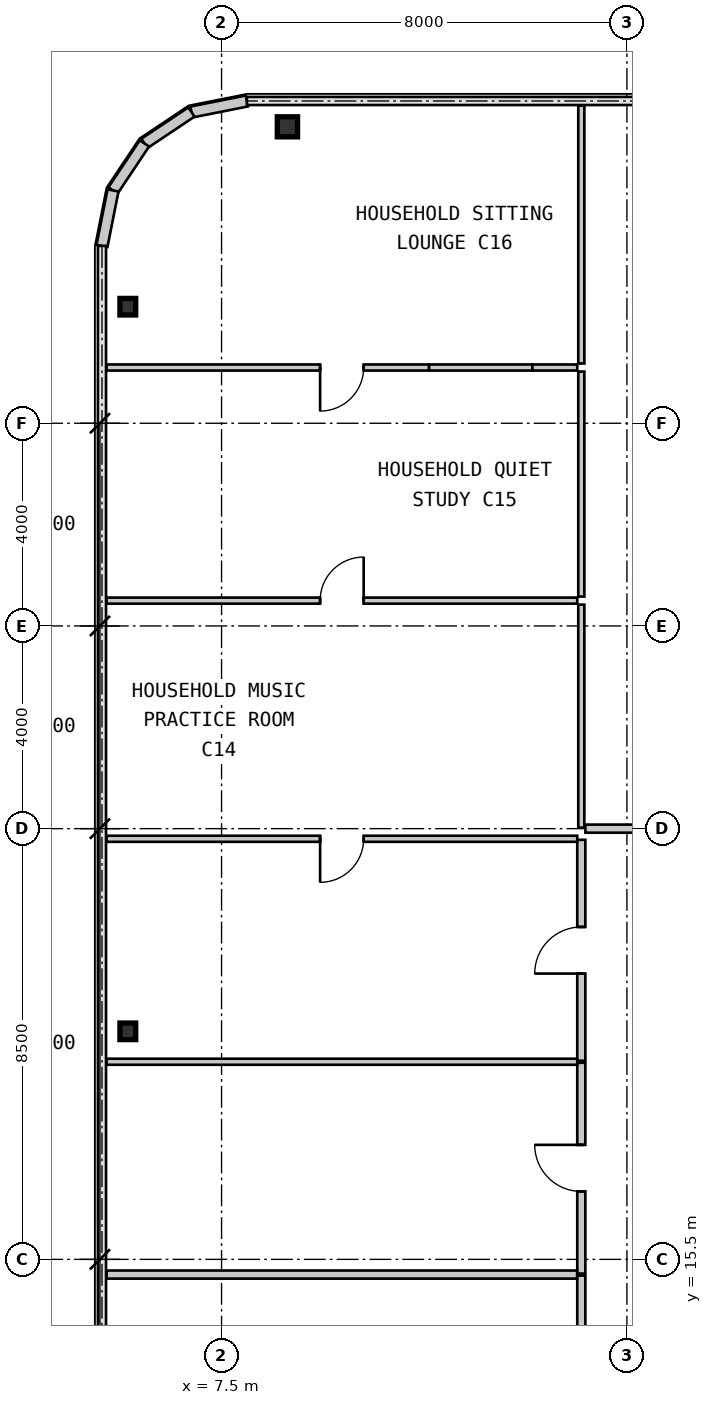
"""IFC4 building model, lengths in metres.
Left out: names, types, materials, properties, quantities, classifications, styles, units other than length and angle.
Written with IfcOpenShell. Run it as: python <this file> out.ifc"""

import sys

from ifc_helpers import new_model, si_unit, direction, frame, frame_2d, origin, origin_2d, place, context, subcontext, project, spatial, rectangle, i_section, extrude, source, transform, mapped, element, fill, save


model = new_model("IFC4")
c1 = context("Model", 3, precision=1e-05, world=origin(), true_north=direction((0.0, 1.0)))
c2 = subcontext(c1, "Body", "Model", "MODEL_VIEW")
j1 = project(units=[si_unit("LENGTHUNIT", "METRE"), si_unit("PLANEANGLEUNIT", "RADIAN")], contexts=[c1])
p1 = place(None, origin())
s1 = spatial("IfcSite", under=j1, at=p1, CompositionType="ELEMENT")
p2 = place(p1, origin())
s2 = spatial("IfcBuilding", under=s1, at=p2, CompositionType="ELEMENT")
p3 = place(p2, frame((0.0, 0.0, 19.95)))
s3 = spatial("IfcBuildingStorey", under=s2, at=p3, CompositionType="ELEMENT", Elevation=19.95)
m1 = source(origin(), c2, "Body", "SweptSolid", [
    extrude(i_section(OverallWidth=0.4, OverallDepth=0.396, WebThickness=0.022, FlangeThickness=0.034, at=origin_2d()), origin(), (0.0, 0.0, 1.0), 3.15),
])
p4 = place(p3, frame((8.8, 37.85, 0.0), z_axis=(0.0, 0.0, 1.0), x_axis=(1.0, 0.0, 0.0)))
e1 = element("IfcColumn", 1, at=p4, inside=s3, PredefinedType="COLUMN", context=c2, shape_type="MappedRepresentation", body=[
    mapped(m1, transform((0.0, 0.0, 0.0), scale=1.0)),
])
m2 = source(origin(), c2, "Body", "SweptSolid", [
    extrude(i_section(OverallWidth=0.311, OverallDepth=0.327, WebThickness=0.016, FlangeThickness=0.025, at=origin_2d()), origin(), (0.0, 0.0, 1.0), 3.15),
])
for number, where, z_axis, x_axis in (
    (2, (5.65, 20.0, 0.0), (0.0, 0.0, 1.0), (1.0, 0.0, 0.0)),
    (3, (5.65, 34.3, 0.0), (0.0, 0.0, 1.0), (1.0, 0.0, 0.0)),
):
    element("IfcColumn", number, at=place(p3, frame(where, z_axis=z_axis, x_axis=x_axis)), inside=s3, PredefinedType="COLUMN", context=c2, shape_type="MappedRepresentation", body=[
        mapped(m2, transform((0.0, 0.0, 0.0), scale=1.0)),
    ])
m3 = source(origin(), c2, "Body", "SweptSolid", [
    extrude(rectangle(XDim=1.116, YDim=0.22, at=frame_2d((0.558, 0.0))), origin(), (0.0, 0.0, 1.0), 2.93),
])
for number, where, z_axis, x_axis in (
    (4, (8.0, 38.36, 0.0), (0.0, 0.0, 1.0), (-0.981, -0.195, 0.0)),
    (5, (6.906, 38.142, 0.0), (0.0, 0.0, 1.0), (-0.831, -0.556, 0.0)),
    (6, (5.978, 37.522, 0.0), (0.0, 0.0, 1.0), (-0.556, -0.831, 0.0)),
    (7, (5.358, 36.594, 0.0), (0.0, 0.0, 1.0), (-0.195, -0.981, 0.0)),
):
    element("IfcWall", number, at=place(p3, frame(where, z_axis=z_axis, x_axis=x_axis)), inside=s3, PredefinedType="SOLIDWALL", context=c2, shape_type="MappedRepresentation", body=[
        mapped(m3, transform((0.0, 0.0, 0.0), scale=1.0)),
    ])
m4 = source(origin(), c2, "Body", "SweptSolid", [
    extrude(rectangle(XDim=3.959, YDim=0.16, at=frame_2d((1.98, 0.0))), origin(), (0.0, 0.0, 1.0), 2.93),
])
p5 = place(p3, frame((14.6, 11.22, 0.0), z_axis=(0.0, 0.0, 1.0), x_axis=(0.0, 1.0, 0.0)))
e8 = element("IfcWall", 8, at=p5, inside=s3, PredefinedType="PARTITIONING", context=c2, shape_type="MappedRepresentation", body=[
    mapped(m4, transform((0.0, 0.0, 0.0), scale=1.0)),
])
m5 = source(origin(), c2, "Body", "SweptSolid", [
    extrude(rectangle(XDim=1.05, YDim=2.1, at=frame_2d((0.525, 1.05))), frame((0.0, 0.09, 0.0), z_axis=(0.0, -1.0, 0.0), x_axis=(1.0, 0.0, 0.0)), (0.0, 0.0, 1.0), 0.18),
])
p6 = place(p5, frame((1.455, 0.0, 0.0)))
e9 = element("IfcOpeningElement", 9, at=p6, cuts=e8, PredefinedType="OPENING", context=c2, shape_type="MappedRepresentation", body=[
    mapped(m5, transform((0.0, 0.0, 0.0), scale=1.0)),
])
m6 = source(origin(), c2, "Body", "SweptSolid", [
    extrude(rectangle(XDim=4.16, YDim=0.16, at=frame_2d((2.08, 0.0))), origin(), (0.0, 0.0, 1.0), 2.93),
])
p7 = place(p3, frame((14.6, 15.22, 0.0), z_axis=(0.0, 0.0, 1.0), x_axis=(0.0, 1.0, 0.0)))
e10 = element("IfcWall", 10, at=p7, inside=s3, PredefinedType="PARTITIONING", context=c2, shape_type="MappedRepresentation", body=[
    mapped(m6, transform((0.0, 0.0, 0.0), scale=1.0)),
])
m7 = source(origin(), c2, "Body", "SweptSolid", [
    extrude(rectangle(XDim=0.92, YDim=2.1, at=frame_2d((0.46, 1.05))), frame((0.0, 0.09, 0.0), z_axis=(0.0, -1.0, 0.0), x_axis=(1.0, 0.0, 0.0)), (0.0, 0.0, 1.0), 0.18),
])
p8 = place(p7, frame((1.62, 0.0, 0.0)))
e11 = element("IfcOpeningElement", 11, at=p8, cuts=e10, PredefinedType="OPENING", context=c2, shape_type="MappedRepresentation", body=[
    mapped(m7, transform((0.0, 0.0, 0.0), scale=1.0)),
])
m8 = source(origin(), c2, "Body", "SweptSolid", [
    extrude(rectangle(XDim=4.36, YDim=0.16, at=frame_2d((2.18, 0.0))), origin(), (0.0, 0.0, 1.0), 2.93),
])
p9 = place(p3, frame((14.6, 19.42, 0.0), z_axis=(0.0, 0.0, 1.0), x_axis=(0.0, 1.0, 0.0)))
e12 = element("IfcWall", 12, at=p9, inside=s3, PredefinedType="PARTITIONING", context=c2, shape_type="MappedRepresentation", body=[
    mapped(m8, transform((0.0, 0.0, 0.0), scale=1.0)),
])
p10 = place(p9, frame((1.72, 0.0, 0.0)))
e13 = element("IfcOpeningElement", 13, at=p10, cuts=e12, PredefinedType="OPENING", context=c2, shape_type="MappedRepresentation", body=[
    mapped(m7, transform((0.0, 0.0, 0.0), scale=1.0)),
])
m9 = source(origin(), c2, "Body", "SweptSolid", [
    extrude(rectangle(XDim=4.13, YDim=0.16, at=frame_2d((2.065, 0.0))), origin(), (0.0, 0.0, 1.0), 2.93),
])
p11 = place(p3, frame((14.68, 24.0, 0.0), z_axis=(0.0, 0.0, 1.0), x_axis=(1.0, 0.0, 0.0)))
e14 = element("IfcWall", 14, at=p11, inside=s3, PredefinedType="PARTITIONING", context=c2, shape_type="MappedRepresentation", body=[
    mapped(m9, transform((0.0, 0.0, 0.0), scale=1.0)),
])
p12 = place(p11, frame((1.69, 0.0, 0.0)))
e15 = element("IfcOpeningElement", 15, at=p12, cuts=e14, PredefinedType="OPENING", context=c2, shape_type="MappedRepresentation", body=[
    mapped(m7, transform((0.0, 0.0, 0.0), scale=1.0)),
])
m10 = source(origin(), c2, "Body", "SweptSolid", [
    extrude(rectangle(XDim=9.286, YDim=0.16, at=frame_2d((4.643, 0.0))), origin(), (0.0, 0.0, 1.0), 2.93),
])
p13 = place(p3, frame((5.232, 15.2, 0.0), z_axis=(0.0, 0.0, 1.0), x_axis=(1.0, 0.0, 0.0)))
e16 = element("IfcWall", 16, at=p13, inside=s3, PredefinedType="PARTITIONING", context=c2, shape_type="MappedRepresentation", body=[
    mapped(m10, transform((0.0, 0.0, 0.0), scale=1.0)),
])
m11 = source(origin(), c2, "Body", "SweptSolid", [
    extrude(rectangle(XDim=9.29, YDim=0.12, at=frame_2d((4.645, 0.0))), origin(), (0.0, 0.0, 1.0), 2.93),
])
p14 = place(p3, frame((5.23, 19.4, 0.0), z_axis=(0.0, 0.0, 1.0), x_axis=(1.0, 0.0, 0.0)))
e17 = element("IfcWall", 17, at=p14, inside=s3, PredefinedType="PARTITIONING", context=c2, shape_type="MappedRepresentation", body=[
    mapped(m11, transform((0.0, 0.0, 0.0), scale=1.0)),
])
p15 = place(p3, frame((5.23, 23.8, 0.0), z_axis=(0.0, 0.0, 1.0), x_axis=(1.0, 0.0, 0.0)))
e18 = element("IfcWall", 18, at=p15, inside=s3, PredefinedType="PARTITIONING", context=c2, shape_type="MappedRepresentation", body=[
    mapped(m11, transform((0.0, 0.0, 0.0), scale=1.0)),
])
m12 = source(origin(), c2, "Body", "SweptSolid", [
    extrude(rectangle(XDim=0.86, YDim=2.1, at=frame_2d((0.43, 1.05))), frame((0.0, 0.07, 0.0), z_axis=(0.0, -1.0, 0.0), x_axis=(1.0, 0.0, 0.0)), (0.0, 0.0, 1.0), 0.14),
])
p16 = place(p15, frame((4.215, 0.0, 0.0)))
e19 = element("IfcOpeningElement", 19, at=p16, cuts=e18, PredefinedType="OPENING", context=c2, shape_type="MappedRepresentation", body=[
    mapped(m12, transform((0.0, 0.0, 0.0), scale=1.0)),
])
p17 = place(p3, frame((5.23, 28.5, 0.0), z_axis=(0.0, 0.0, 1.0), x_axis=(1.0, 0.0, 0.0)))
e20 = element("IfcWall", 20, at=p17, inside=s3, PredefinedType="PARTITIONING", context=c2, shape_type="MappedRepresentation", body=[
    mapped(m11, transform((0.0, 0.0, 0.0), scale=1.0)),
])
p18 = place(p17, frame((4.215, 0.0, 0.0)))
e21 = element("IfcOpeningElement", 21, at=p18, cuts=e20, PredefinedType="OPENING", context=c2, shape_type="MappedRepresentation", body=[
    mapped(m12, transform((0.0, 0.0, 0.0), scale=1.0)),
])
m13 = source(origin(), c2, "Body", "SweptSolid", [
    extrude(rectangle(XDim=4.4, YDim=0.12, at=frame_2d((2.2, 0.0))), origin(), (0.0, 0.0, 1.0), 2.93),
])
p19 = place(p3, frame((14.6, 28.42, 0.0), z_axis=(0.0, 0.0, 1.0), x_axis=(0.0, -1.0, 0.0)))
e22 = element("IfcWall", 22, at=p19, inside=s3, PredefinedType="PARTITIONING", context=c2, shape_type="MappedRepresentation", body=[
    mapped(m13, transform((0.0, 0.0, 0.0), scale=1.0)),
])
m14 = source(origin(), c2, "Body", "SweptSolid", [
    extrude(rectangle(XDim=6.365, YDim=0.12, at=frame_2d((3.183, 0.0))), origin(), (0.0, 0.0, 1.0), 2.93),
])
p20 = place(p3, frame((5.23, 33.1, 0.0), z_axis=(0.0, 0.0, 1.0), x_axis=(1.0, 0.0, 0.0)))
e23 = element("IfcWall", 23, at=p20, inside=s3, PredefinedType="PARTITIONING", context=c2, shape_type="MappedRepresentation", body=[
    mapped(m14, transform((0.0, 0.0, 0.0), scale=1.0)),
])
p21 = place(p20, frame((4.215, 0.0, 0.0)))
e24 = element("IfcOpeningElement", 24, at=p21, cuts=e23, PredefinedType="OPENING", context=c2, shape_type="MappedRepresentation", body=[
    mapped(m12, transform((0.0, 0.0, 0.0), scale=1.0)),
])
m15 = source(origin(), c2, "Body", "SweptSolid", [
    extrude(rectangle(XDim=2.04, YDim=0.12, at=frame_2d((1.02, 0.0))), origin(), (0.0, 0.0, 1.0), 2.328),
])
p22 = place(p3, frame((11.595, 33.1, 0.0), z_axis=(0.0, 0.0, 1.0), x_axis=(1.0, 0.0, 0.0)))
e25 = element("IfcWall", 25, at=p22, inside=s3, PredefinedType="PARTITIONING", context=c2, shape_type="MappedRepresentation", body=[
    mapped(m15, transform((0.0, 0.0, 0.0), scale=1.0)),
])
m16 = source(origin(), c2, "Body", "SweptSolid", [
    extrude(rectangle(XDim=0.885, YDim=0.12, at=frame_2d((0.442, 0.0))), origin(), (0.0, 0.0, 1.0), 2.93),
])
p23 = place(p3, frame((13.635, 33.1, 0.0), z_axis=(0.0, 0.0, 1.0), x_axis=(1.0, 0.0, 0.0)))
e26 = element("IfcWall", 26, at=p23, inside=s3, PredefinedType="PARTITIONING", context=c2, shape_type="MappedRepresentation", body=[
    mapped(m16, transform((0.0, 0.0, 0.0), scale=1.0)),
])
m17 = source(origin(), c2, "Body", "SweptSolid", [
    extrude(rectangle(XDim=4.44, YDim=0.12, at=frame_2d((2.22, 0.0))), origin(), (0.0, 0.0, 1.0), 2.93),
])
p24 = place(p3, frame((14.6, 33.02, 0.0), z_axis=(0.0, 0.0, 1.0), x_axis=(0.0, -1.0, 0.0)))
e27 = element("IfcWall", 27, at=p24, inside=s3, PredefinedType="PARTITIONING", context=c2, shape_type="MappedRepresentation", body=[
    mapped(m17, transform((0.0, 0.0, 0.0), scale=1.0)),
])
m18 = source(origin(), c2, "Body", "SweptSolid", [
    extrude(rectangle(XDim=5.09, YDim=0.12, at=frame_2d((2.545, 0.0))), origin(), (0.0, 0.0, 1.0), 2.93),
])
p25 = place(p3, frame((14.6, 38.27, 0.0), z_axis=(0.0, 0.0, 1.0), x_axis=(0.0, -1.0, 0.0)))
e28 = element("IfcWall", 28, at=p25, inside=s3, PredefinedType="PARTITIONING", context=c2, shape_type="MappedRepresentation", body=[
    mapped(m18, transform((0.0, 0.0, 0.0), scale=1.0)),
])
m19 = source(origin(), c2, "Body", "SweptSolid", [
    extrude(rectangle(XDim=0.92, YDim=2.1, at=frame_2d((0.46, 1.05))), frame((0.0, 0.025, 0.0), z_axis=(0.0, -1.0, 0.0), x_axis=(1.0, 0.0, 0.0)), (0.0, 0.0, 1.0), 0.05),
])
p26 = place(p8, origin())
e29 = element("IfcDoor", 29, at=p26, inside=s3, OperationType="SINGLE_SWING_RIGHT", PredefinedType="DOOR", context=c2, shape_type="MappedRepresentation", body=[
    mapped(m19, transform((0.0, 0.0, 0.0), scale=1.0)),
])
fill(e11, e29)
p27 = place(p10, origin())
e30 = element("IfcDoor", 30, at=p27, inside=s3, OperationType="SINGLE_SWING_LEFT", PredefinedType="DOOR", context=c2, shape_type="MappedRepresentation", body=[
    mapped(m19, transform((0.0, 0.0, 0.0), scale=1.0)),
])
fill(e13, e30)
m20 = source(origin(), c2, "Body", "SweptSolid", [
    extrude(rectangle(XDim=0.86, YDim=2.1, at=frame_2d((0.43, 1.05))), frame((0.0, 0.025, 0.0), z_axis=(0.0, -1.0, 0.0), x_axis=(1.0, 0.0, 0.0)), (0.0, 0.0, 1.0), 0.05),
])
p28 = place(p16, frame((0.86, 0.0, 0.0), z_axis=(0.0, 0.0, 1.0), x_axis=(-1.0, 0.0, 0.0)))
e31 = element("IfcDoor", 31, at=p28, inside=s3, OperationType="SINGLE_SWING_RIGHT", PredefinedType="DOOR", context=c2, shape_type="MappedRepresentation", body=[
    mapped(m20, transform((0.0, 0.0, 0.0), scale=1.0)),
])
fill(e19, e31)
p29 = place(p18, origin())
e32 = element("IfcDoor", 32, at=p29, inside=s3, OperationType="SINGLE_SWING_RIGHT", PredefinedType="DOOR", context=c2, shape_type="MappedRepresentation", body=[
    mapped(m20, transform((0.0, 0.0, 0.0), scale=1.0)),
])
fill(e21, e32)
p30 = place(p21, frame((0.86, 0.0, 0.0), z_axis=(0.0, 0.0, 1.0), x_axis=(-1.0, 0.0, 0.0)))
e33 = element("IfcDoor", 33, at=p30, inside=s3, OperationType="SINGLE_SWING_RIGHT", PredefinedType="DOOR", context=c2, shape_type="MappedRepresentation", body=[
    mapped(m20, transform((0.0, 0.0, 0.0), scale=1.0)),
])
fill(e24, e33)
save(model, sys.argv[1])
